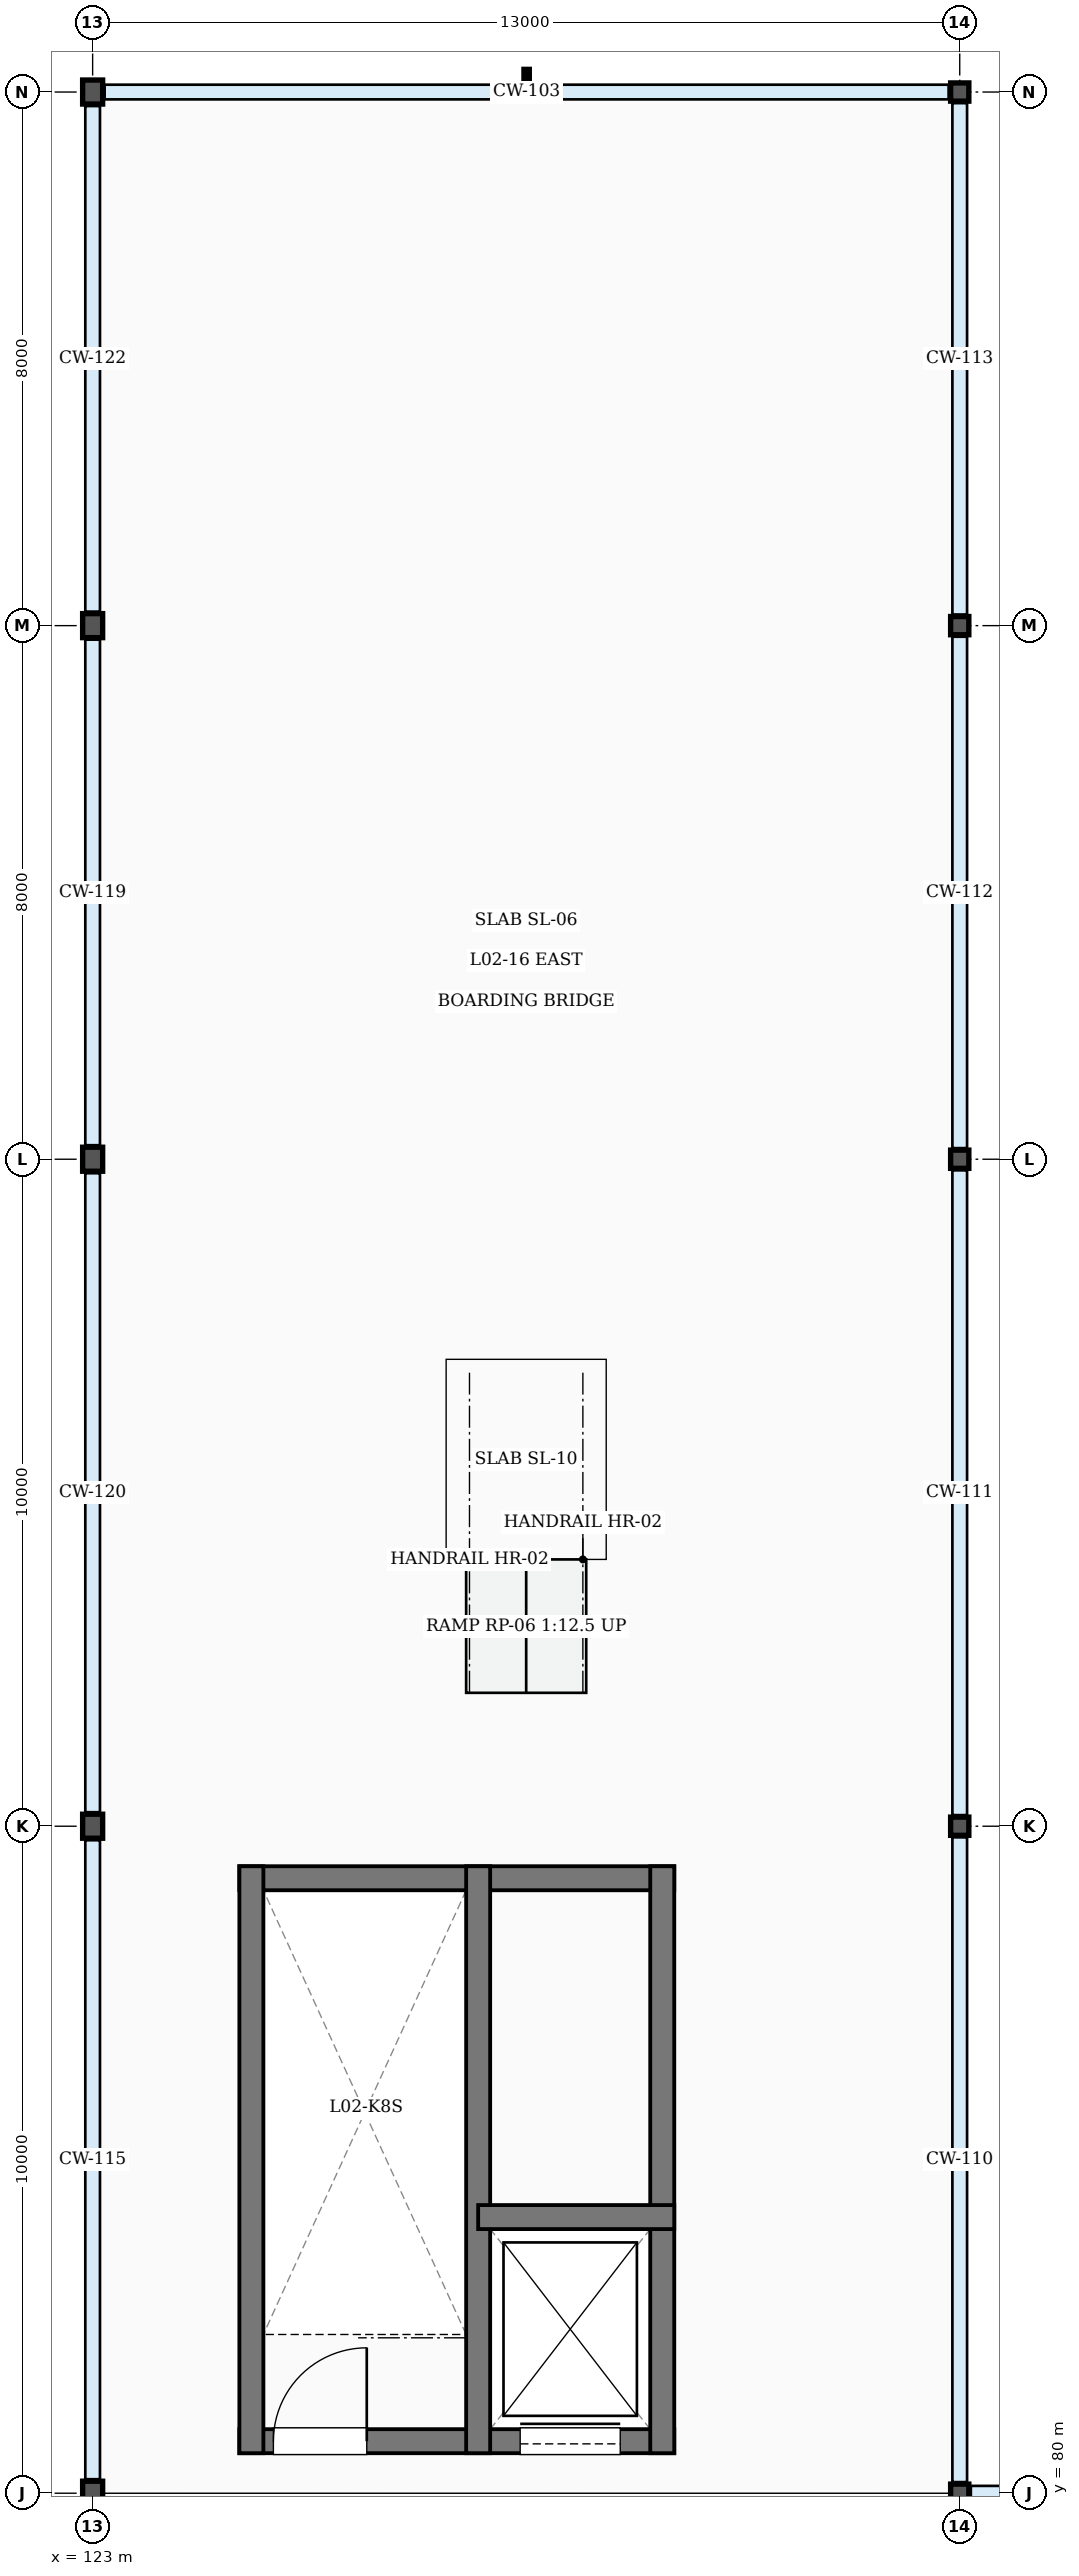
"""IFC4 building model, lengths in metres.
Left out: names, types, materials, properties, quantities, classifications, styles, units other than length and angle.
Written with IfcOpenShell. Run it as: python <this file> out.ifc"""

import sys

from ifc_helpers import new_model, si_unit, direction, frame, frame_2d, origin, origin_2d, place, context, subcontext, project, spatial, rectangle, hollow_circle, i_section, extrude, element, fill, save


model = new_model("IFC4")
c1 = context("Model", 3, precision=1e-05, world=origin(), true_north=direction((0.0, 1.0)))
c2 = subcontext(c1, "Body", "Model", "MODEL_VIEW")
j1 = project(units=[si_unit("LENGTHUNIT", "METRE"), si_unit("PLANEANGLEUNIT", "RADIAN")], contexts=[c1])
p1 = place(None, origin())
s1 = spatial("IfcSite", under=j1, at=p1, CompositionType="ELEMENT")
p2 = place(p1, origin())
s2 = spatial("IfcBuilding", under=s1, at=p2, CompositionType="ELEMENT")
p3 = place(p2, frame((0.0, 0.0, 10.2)))
s3 = spatial("IfcBuildingStorey", under=s2, at=p3, CompositionType="ELEMENT", Elevation=10.2)
for number, where, z_axis, x_axis in (
    (1, (123.0, 80.0, 0.0), (0.0, 0.0, 1.0), (1.0, 0.0, 0.0)),
    (2, (123.0, 90.0, 0.0), (0.0, 0.0, 1.0), (1.0, 0.0, 0.0)),
    (3, (123.0, 100.0, 0.0), (0.0, 0.0, 1.0), (1.0, 0.0, 0.0)),
    (4, (123.0, 108.0, 0.0), (0.0, 0.0, 1.0), (1.0, 0.0, 0.0)),
    (5, (123.0, 116.0, 0.0), (0.0, 0.0, 1.0), (1.0, 0.0, 0.0)),
):
    element("IfcColumn", number, at=place(p3, frame(where, z_axis=z_axis, x_axis=x_axis)), inside=s3, PredefinedType="COLUMN", context=c2, shape_type="SweptSolid", body=[
        extrude(i_section(OverallWidth=0.3, OverallDepth=0.36, WebThickness=0.012, FlangeThickness=0.022, FilletRadius=0.027, at=origin_2d()), origin(), (0.0, 0.0, 1.0), 4.2),
    ])
for number, where, z_axis, x_axis in (
    (6, (136.0, 80.0, 0.0), (0.0, 0.0, 1.0), (1.0, 0.0, 0.0)),
    (7, (136.0, 90.0, 0.0), (0.0, 0.0, 1.0), (1.0, 0.0, 0.0)),
    (8, (136.0, 100.0, 0.0), (0.0, 0.0, 1.0), (1.0, 0.0, 0.0)),
    (9, (136.0, 108.0, 0.0), (0.0, 0.0, 1.0), (1.0, 0.0, 0.0)),
    (10, (136.0, 116.0, 0.0), (0.0, 0.0, 1.0), (1.0, 0.0, 0.0)),
):
    element("IfcColumn", number, at=place(p3, frame(where, z_axis=z_axis, x_axis=x_axis)), inside=s3, PredefinedType="COLUMN", context=c2, shape_type="SweptSolid", body=[
        extrude(hollow_circle(Radius=0.136, WallThickness=0.012, at=origin_2d()), origin(), (0.0, 0.0, 1.0), 4.2),
    ])
p4 = place(p3, frame((125.2, 80.78, 0.0), z_axis=(0.0, 0.0, 1.0), x_axis=(1.0, 0.0, 0.0)))
e11 = element("IfcWall", 11, at=p4, inside=s3, PredefinedType="SHEAR", context=c2, shape_type="SweptSolid", body=[
    extrude(rectangle(XDim=6.52, YDim=0.36, at=frame_2d((3.26, 0.0))), origin(), (0.0, 0.0, 1.0), 3.65),
])
p5 = place(p4, frame((0.51, 0.0, 0.0)))
e12 = element("IfcOpeningElement", 12, at=p5, cuts=e11, PredefinedType="OPENING", context=c2, shape_type="SweptSolid", body=[
    extrude(rectangle(XDim=1.4, YDim=2.35, at=frame_2d((0.7, 1.175))), frame((0.0, 0.19, 0.0), z_axis=(0.0, -1.0, 0.0), x_axis=(1.0, 0.0, 0.0)), (0.0, 0.0, 1.0), 0.38),
])
p6 = place(p4, frame((4.21, 0.0, 0.0)))
e13 = element("IfcOpeningElement", 13, at=p6, cuts=e11, PredefinedType="OPENING", context=c2, shape_type="SweptSolid", body=[
    extrude(rectangle(XDim=1.5, YDim=2.4, at=frame_2d((0.75, 1.2))), frame((0.0, 0.19, 0.0), z_axis=(0.0, -1.0, 0.0), x_axis=(1.0, 0.0, 0.0)), (0.0, 0.0, 1.0), 0.38),
])
p7 = place(p3, frame((125.2, 89.22, 0.0), z_axis=(0.0, 0.0, 1.0), x_axis=(1.0, 0.0, 0.0)))
e14 = element("IfcWall", 14, at=p7, inside=s3, PredefinedType="SHEAR", context=c2, shape_type="SweptSolid", body=[
    extrude(rectangle(XDim=6.52, YDim=0.36, at=frame_2d((3.26, 0.0))), origin(), (0.0, 0.0, 1.0), 3.65),
])
for number, where, z_axis, x_axis in (
    (15, (125.38, 80.6, 0.0), (0.0, 0.0, 1.0), (0.0, 1.0, 0.0)),
    (16, (131.54, 80.6, 0.0), (0.0, 0.0, 1.0), (0.0, 1.0, 0.0)),
    (17, (128.78, 80.6, 0.0), (0.0, 0.0, 1.0), (0.0, 1.0, 0.0)),
):
    element("IfcWall", number, at=place(p3, frame(where, z_axis=z_axis, x_axis=x_axis)), inside=s3, PredefinedType="SHEAR", context=c2, shape_type="SweptSolid", body=[
        extrude(rectangle(XDim=8.8, YDim=0.36, at=frame_2d((4.4, 0.0))), origin(), (0.0, 0.0, 1.0), 3.65),
    ])
p8 = place(p3, frame((128.78, 84.14, 0.0), z_axis=(0.0, 0.0, 1.0), x_axis=(1.0, 0.0, 0.0)))
e18 = element("IfcWall", 18, at=p8, inside=s3, PredefinedType="SHEAR", context=c2, shape_type="SweptSolid", body=[
    extrude(rectangle(XDim=2.94, YDim=0.36, at=frame_2d((1.47, 0.0))), origin(), (0.0, 0.0, 1.0), 3.65),
])
p9 = place(p5, origin())
e19 = element("IfcDoor", 19, at=p9, inside=s3, OperationType="SINGLE_SWING_RIGHT", PredefinedType="DOOR", context=c2, shape_type="SweptSolid", body=[
    extrude(rectangle(XDim=1.4, YDim=2.35, at=frame_2d((0.7, 1.175))), frame((0.0, 0.025, 0.0), z_axis=(0.0, -1.0, 0.0), x_axis=(1.0, 0.0, 0.0)), (0.0, 0.0, 1.0), 0.05),
])
fill(e12, e19)
p10 = place(p6, origin())
e20 = element("IfcDoor", 20, at=p10, inside=s3, OperationType="SLIDING_TO_LEFT", PredefinedType="DOOR", context=c2, shape_type="SweptSolid", body=[
    extrude(rectangle(XDim=1.5, YDim=2.4, at=frame_2d((0.75, 1.2))), frame((0.0, 0.025, 0.0), z_axis=(0.0, -1.0, 0.0), x_axis=(1.0, 0.0, 0.0)), (0.0, 0.0, 1.0), 0.05),
])
fill(e13, e20)
save(model, sys.argv[1])
